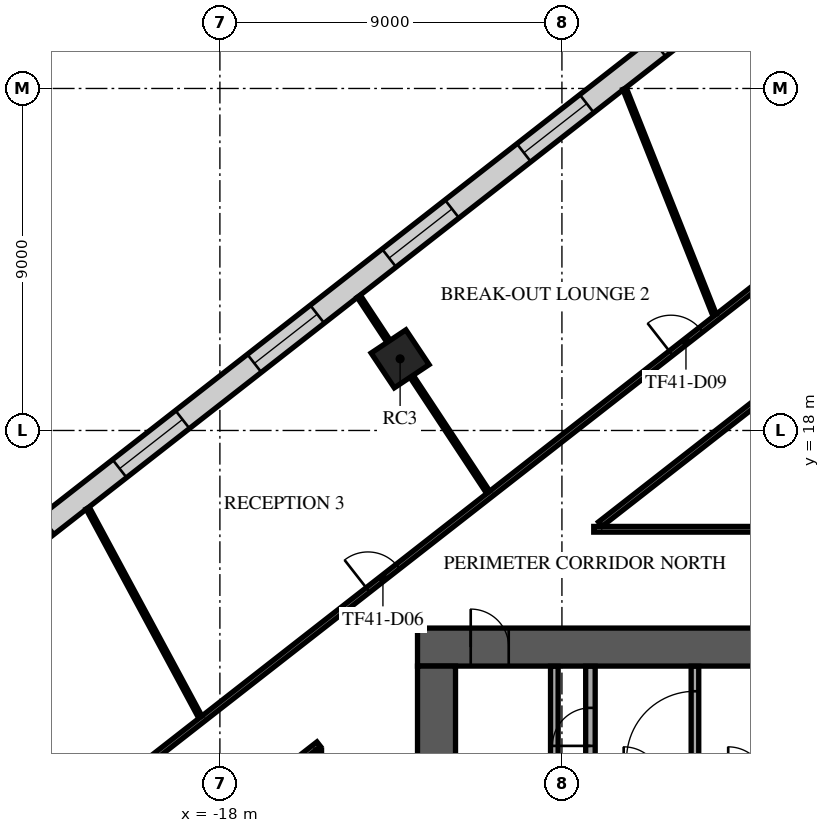
"""IFC4 building model, lengths in metres.
Left out: names, types, materials, properties, quantities, classifications, styles, units other than length and angle.
Written with IfcOpenShell. Run it as: python <this file> out.ifc"""

import sys

from ifc_helpers import new_model, si_unit, direction, frame, frame_2d, origin, origin_2d, place, context, subcontext, project, spatial, rectangle, extrude, element, fill, save


model = new_model("IFC4")
c1 = context("Model", 3, precision=1e-05, world=origin(), true_north=direction((0.0, 1.0)))
c2 = subcontext(c1, "Body", "Model", "MODEL_VIEW")
j1 = project(units=[si_unit("LENGTHUNIT", "METRE"), si_unit("PLANEANGLEUNIT", "RADIAN")], contexts=[c1])
p1 = place(None, origin())
s1 = spatial("IfcSite", under=j1, at=p1, CompositionType="ELEMENT")
p2 = place(p1, origin())
s2 = spatial("IfcBuilding", under=s1, at=p2, CompositionType="ELEMENT")
p3 = place(p2, frame((0.0, 0.0, 175.7)))
s3 = spatial("IfcBuildingStorey", under=s2, at=p3, CompositionType="ELEMENT", Elevation=175.7)
p4 = place(p3, frame((-13.258, 19.885, 0.0), z_axis=(0.0, 0.0, 1.0), x_axis=(0.832028680356, 0.55473261583, 0.0)))
e1 = element("IfcColumn", 1, at=p4, inside=s3, PredefinedType="COLUMN", context=c2, shape_type="SweptSolid", body=[
    extrude(rectangle(XDim=1.1, YDim=1.1, at=origin_2d()), origin(), (0.0, 0.0, 1.0), 4.0),
])
p5 = place(p3, frame((-12.8, 12.3, 0.0), z_axis=(0.0, 0.0, 1.0), x_axis=(1.0, 0.0, 0.0)))
e2 = element("IfcWall", 2, at=p5, inside=s3, PredefinedType="SHEAR", context=c2, shape_type="SweptSolid", body=[
    extrude(rectangle(XDim=25.6, YDim=1.0, at=frame_2d((12.8, 0.0))), origin(), (0.0, 0.0, 1.0), 3.6),
])
p6 = place(p5, frame((11.6, 0.0, 0.0)))
e3 = element("IfcOpeningElement", 3, at=p6, cuts=e2, PredefinedType="OPENING", context=c2, shape_type="SweptSolid", body=[
    extrude(rectangle(XDim=2.4, YDim=2.4, at=frame_2d((1.2, 1.2))), frame((0.0, 0.51, 0.0), z_axis=(0.0, -1.0, 0.0), x_axis=(1.0, 0.0, 0.0)), (0.0, 0.0, 1.0), 1.02),
])
p7 = place(p5, frame((22.425, 0.0, 0.0)))
e4 = element("IfcOpeningElement", 4, at=p7, cuts=e2, PredefinedType="OPENING", context=c2, shape_type="SweptSolid", body=[
    extrude(rectangle(XDim=1.2, YDim=2.1, at=frame_2d((0.6, 1.05))), frame((0.0, 0.51, 0.0), z_axis=(0.0, -1.0, 0.0), x_axis=(1.0, 0.0, 0.0)), (0.0, 0.0, 1.0), 1.02),
])
p8 = place(p5, frame((1.4, 0.0, 0.0)))
e5 = element("IfcOpeningElement", 5, at=p8, cuts=e2, PredefinedType="OPENING", context=c2, shape_type="SweptSolid", body=[
    extrude(rectangle(XDim=1.0, YDim=2.1, at=frame_2d((0.5, 1.05))), frame((0.0, 0.51, 0.0), z_axis=(0.0, -1.0, 0.0), x_axis=(1.0, 0.0, 0.0)), (0.0, 0.0, 1.0), 1.02),
])
p9 = place(p3, frame((-12.3, -11.8, 0.0), z_axis=(0.0, 0.0, 1.0), x_axis=(0.0, 1.0, 0.0)))
e6 = element("IfcWall", 6, at=p9, inside=s3, PredefinedType="SHEAR", context=c2, shape_type="SweptSolid", body=[
    extrude(rectangle(XDim=23.6, YDim=1.0, at=frame_2d((11.8, 0.0))), origin(), (0.0, 0.0, 1.0), 3.6),
])
p10 = place(p9, frame((10.6, 0.0, 0.0)))
e7 = element("IfcOpeningElement", 7, at=p10, cuts=e6, PredefinedType="OPENING", context=c2, shape_type="SweptSolid", body=[
    extrude(rectangle(XDim=2.4, YDim=2.4, at=frame_2d((1.2, 1.2))), frame((0.0, 0.51, 0.0), z_axis=(0.0, -1.0, 0.0), x_axis=(1.0, 0.0, 0.0)), (0.0, 0.0, 1.0), 1.02),
])
p11 = place(p3, frame((-9.2, 4.78, 0.0), z_axis=(0.0, 0.0, 1.0), x_axis=(0.0, 1.0, 0.0)))
e8 = element("IfcWall", 8, at=p11, inside=s3, PredefinedType="PARTITIONING", context=c2, shape_type="SweptSolid", body=[
    extrude(rectangle(XDim=7.015, YDim=0.2, at=frame_2d((3.507, 0.0))), origin(), (0.0, 0.0, 1.0), 3.6),
])
p12 = place(p11, frame((2.92, 0.0, 0.0)))
e9 = element("IfcOpeningElement", 9, at=p12, cuts=e8, PredefinedType="OPENING", context=c2, shape_type="SweptSolid", body=[
    extrude(rectangle(XDim=1.0, YDim=2.1, at=frame_2d((0.5, 1.05))), frame((0.0, 0.11, 0.0), z_axis=(0.0, -1.0, 0.0), x_axis=(1.0, 0.0, 0.0)), (0.0, 0.0, 1.0), 0.22),
])
p13 = place(p3, frame((-8.25, 8.805, 0.0), z_axis=(0.0, 0.0, 1.0), x_axis=(0.0, 1.0, 0.0)))
e10 = element("IfcWall", 10, at=p13, inside=s3, PredefinedType="PARTITIONING", context=c2, shape_type="SweptSolid", body=[
    extrude(rectangle(XDim=2.99, YDim=0.25, at=frame_2d((1.495, 0.0))), origin(), (0.0, 0.0, 1.0), 3.6),
])
p14 = place(p13, frame((0.895, 0.0, 0.0)))
e11 = element("IfcOpeningElement", 11, at=p14, cuts=e10, PredefinedType="OPENING", context=c2, shape_type="SweptSolid", body=[
    extrude(rectangle(XDim=1.0, YDim=2.1, at=frame_2d((0.5, 1.05))), frame((0.0, 0.135, 0.0), z_axis=(0.0, -1.0, 0.0), x_axis=(1.0, 0.0, 0.0)), (0.0, 0.0, 1.0), 0.27),
])
p15 = place(p3, frame((-5.5, 8.805, 0.0), z_axis=(0.0, 0.0, 1.0), x_axis=(0.0, 1.0, 0.0)))
e12 = element("IfcWall", 12, at=p15, inside=s3, PredefinedType="PARTITIONING", context=c2, shape_type="SweptSolid", body=[
    extrude(rectangle(XDim=2.99, YDim=0.2, at=frame_2d((1.495, 0.0))), origin(), (0.0, 0.0, 1.0), 3.6),
])
p16 = place(p15, frame((0.532, 0.0, 0.0)))
e13 = element("IfcOpeningElement", 13, at=p16, cuts=e12, PredefinedType="OPENING", context=c2, shape_type="SweptSolid", body=[
    extrude(rectangle(XDim=1.8, YDim=2.1, at=frame_2d((0.9, 1.05))), frame((0.0, 0.11, 0.0), z_axis=(0.0, -1.0, 0.0), x_axis=(1.0, 0.0, 0.0)), (0.0, 0.0, 1.0), 0.22),
])
p17 = place(p3, frame((3.238, 35.651, 0.0), z_axis=(0.0, 0.0, 1.0), x_axis=(-0.788009530914, -0.615663040298, 0.0)))
e14 = element("IfcWall", 14, at=p17, inside=s3, PredefinedType="STANDARD", context=c2, shape_type="SweptSolid", body=[
    extrude(rectangle(XDim=49.376, YDim=0.6, at=frame_2d((24.688, 0.0))), origin(), (0.0, 0.0, 1.0), 3.6),
])
p18 = place(p17, frame((1.2, 0.0, 0.9)))
e15 = element("IfcOpeningElement", 15, at=p18, cuts=e14, PredefinedType="OPENING", context=c2, shape_type="SweptSolid", body=[
    extrude(rectangle(XDim=2.1, YDim=2.1, at=frame_2d((1.05, 1.05))), frame((0.0, 0.31, 0.0), z_axis=(0.0, -1.0, 0.0), x_axis=(1.0, 0.0, 0.0)), (0.0, 0.0, 1.0), 0.62),
])
p19 = place(p17, frame((5.7, 0.0, 0.9)))
e16 = element("IfcOpeningElement", 16, at=p19, cuts=e14, PredefinedType="OPENING", context=c2, shape_type="SweptSolid", body=[
    extrude(rectangle(XDim=2.1, YDim=2.1, at=frame_2d((1.05, 1.05))), frame((0.0, 0.31, 0.0), z_axis=(0.0, -1.0, 0.0), x_axis=(1.0, 0.0, 0.0)), (0.0, 0.0, 1.0), 0.62),
])
p20 = place(p17, frame((10.2, 0.0, 0.9)))
e17 = element("IfcOpeningElement", 17, at=p20, cuts=e14, PredefinedType="OPENING", context=c2, shape_type="SweptSolid", body=[
    extrude(rectangle(XDim=2.1, YDim=2.1, at=frame_2d((1.05, 1.05))), frame((0.0, 0.31, 0.0), z_axis=(0.0, -1.0, 0.0), x_axis=(1.0, 0.0, 0.0)), (0.0, 0.0, 1.0), 0.62),
])
p21 = place(p17, frame((14.7, 0.0, 0.9)))
e18 = element("IfcOpeningElement", 18, at=p21, cuts=e14, PredefinedType="OPENING", context=c2, shape_type="SweptSolid", body=[
    extrude(rectangle(XDim=2.1, YDim=2.1, at=frame_2d((1.05, 1.05))), frame((0.0, 0.31, 0.0), z_axis=(0.0, -1.0, 0.0), x_axis=(1.0, 0.0, 0.0)), (0.0, 0.0, 1.0), 0.62),
])
p22 = place(p17, frame((19.2, 0.0, 0.9)))
e19 = element("IfcOpeningElement", 19, at=p22, cuts=e14, PredefinedType="OPENING", context=c2, shape_type="SweptSolid", body=[
    extrude(rectangle(XDim=2.1, YDim=2.1, at=frame_2d((1.05, 1.05))), frame((0.0, 0.31, 0.0), z_axis=(0.0, -1.0, 0.0), x_axis=(1.0, 0.0, 0.0)), (0.0, 0.0, 1.0), 0.62),
])
p23 = place(p17, frame((23.7, 0.0, 0.9)))
e20 = element("IfcOpeningElement", 20, at=p23, cuts=e14, PredefinedType="OPENING", context=c2, shape_type="SweptSolid", body=[
    extrude(rectangle(XDim=2.1, YDim=2.1, at=frame_2d((1.05, 1.05))), frame((0.0, 0.31, 0.0), z_axis=(0.0, -1.0, 0.0), x_axis=(1.0, 0.0, 0.0)), (0.0, 0.0, 1.0), 0.62),
])
p24 = place(p17, frame((28.2, 0.0, 0.9)))
e21 = element("IfcOpeningElement", 21, at=p24, cuts=e14, PredefinedType="OPENING", context=c2, shape_type="SweptSolid", body=[
    extrude(rectangle(XDim=2.1, YDim=2.1, at=frame_2d((1.05, 1.05))), frame((0.0, 0.31, 0.0), z_axis=(0.0, -1.0, 0.0), x_axis=(1.0, 0.0, 0.0)), (0.0, 0.0, 1.0), 0.62),
])
p25 = place(p17, frame((32.7, 0.0, 0.9)))
e22 = element("IfcOpeningElement", 22, at=p25, cuts=e14, PredefinedType="OPENING", context=c2, shape_type="SweptSolid", body=[
    extrude(rectangle(XDim=2.1, YDim=2.1, at=frame_2d((1.05, 1.05))), frame((0.0, 0.31, 0.0), z_axis=(0.0, -1.0, 0.0), x_axis=(1.0, 0.0, 0.0)), (0.0, 0.0, 1.0), 0.62),
])
p26 = place(p17, frame((37.2, 0.0, 0.9)))
e23 = element("IfcOpeningElement", 23, at=p26, cuts=e14, PredefinedType="OPENING", context=c2, shape_type="SweptSolid", body=[
    extrude(rectangle(XDim=2.1, YDim=2.1, at=frame_2d((1.05, 1.05))), frame((0.0, 0.31, 0.0), z_axis=(0.0, -1.0, 0.0), x_axis=(1.0, 0.0, 0.0)), (0.0, 0.0, 1.0), 0.62),
])
p27 = place(p17, frame((41.7, 0.0, 0.9)))
e24 = element("IfcOpeningElement", 24, at=p27, cuts=e14, PredefinedType="OPENING", context=c2, shape_type="SweptSolid", body=[
    extrude(rectangle(XDim=2.1, YDim=2.1, at=frame_2d((1.05, 1.05))), frame((0.0, 0.31, 0.0), z_axis=(0.0, -1.0, 0.0), x_axis=(1.0, 0.0, 0.0)), (0.0, 0.0, 1.0), 0.62),
])
p28 = place(p17, frame((46.138, 0.0, 0.9)))
e25 = element("IfcOpeningElement", 25, at=p28, cuts=e14, PredefinedType="OPENING", context=c2, shape_type="SweptSolid", body=[
    extrude(rectangle(XDim=2.1, YDim=2.1, at=frame_2d((1.05, 1.05))), frame((0.0, 0.31, 0.0), z_axis=(0.0, -1.0, 0.0), x_axis=(1.0, 0.0, 0.0)), (0.0, 0.0, 1.0), 0.62),
])
p29 = place(p3, frame((-24.433, 5.734, 0.0), z_axis=(0.0, 0.0, 1.0), x_axis=(0.788010131951, 0.615662271008, 0.0)))
e26 = element("IfcWall", 26, at=p29, inside=s3, PredefinedType="PARTITIONING", context=c2, shape_type="SweptSolid", body=[
    extrude(rectangle(XDim=31.448, YDim=0.15, at=frame_2d((15.724, 0.0))), origin(), (0.0, 0.0, 1.0), 3.15),
])
p30 = place(p29, frame((13.108, 0.0, 0.0)))
e27 = element("IfcOpeningElement", 27, at=p30, cuts=e26, PredefinedType="OPENING", context=c2, shape_type="SweptSolid", body=[
    extrude(rectangle(XDim=1.0, YDim=2.1, at=frame_2d((0.5, 1.05))), frame((0.0, 0.085, 0.0), z_axis=(0.0, -1.0, 0.0), x_axis=(1.0, 0.0, 0.0)), (0.0, 0.0, 1.0), 0.17),
])
p31 = place(p29, frame((23.227, 0.0, 0.0)))
e28 = element("IfcOpeningElement", 28, at=p31, cuts=e26, PredefinedType="OPENING", context=c2, shape_type="SweptSolid", body=[
    extrude(rectangle(XDim=1.0, YDim=2.1, at=frame_2d((0.5, 1.05))), frame((0.0, 0.085, 0.0), z_axis=(0.0, -1.0, 0.0), x_axis=(1.0, 0.0, 0.0)), (0.0, 0.0, 1.0), 0.17),
])
p32 = place(p3, frame((-22.897, 3.888, 0.0), z_axis=(0.0, 0.0, 1.0), x_axis=(0.787982356531, 0.615697820197, 0.0)))
e29 = element("IfcWall", 29, at=p32, inside=s3, PredefinedType="PARTITIONING", context=c2, shape_type="SweptSolid", body=[
    extrude(rectangle(XDim=9.514, YDim=0.15, at=frame_2d((4.757, 0.0))), origin(), (0.0, 0.0, 1.0), 3.15),
])
p33 = place(p3, frame((-15.4, -12.8, 0.0), z_axis=(0.0, 0.0, 1.0), x_axis=(0.0, 1.0, 0.0)))
e30 = element("IfcWall", 30, at=p33, inside=s3, PredefinedType="PARTITIONING", context=c2, shape_type="SweptSolid", body=[
    extrude(rectangle(XDim=22.392, YDim=0.15, at=frame_2d((11.196, 0.0))), origin(), (0.0, 0.0, 1.0), 3.15),
])
p34 = place(p33, frame((9.721, 0.0, 0.0)))
e31 = element("IfcOpeningElement", 31, at=p34, cuts=e30, PredefinedType="OPENING", context=c2, shape_type="SweptSolid", body=[
    extrude(rectangle(XDim=1.8, YDim=2.1, at=frame_2d((0.9, 1.05))), frame((0.0, 0.085, 0.0), z_axis=(0.0, -1.0, 0.0), x_axis=(1.0, 0.0, 0.0)), (0.0, 0.0, 1.0), 0.17),
])
p35 = place(p33, frame((4.3, 0.0, 0.0)))
e32 = element("IfcOpeningElement", 32, at=p35, cuts=e30, PredefinedType="OPENING", context=c2, shape_type="SweptSolid", body=[
    extrude(rectangle(XDim=1.0, YDim=2.1, at=frame_2d((0.5, 1.05))), frame((0.0, 0.085, 0.0), z_axis=(0.0, -1.0, 0.0), x_axis=(1.0, 0.0, 0.0)), (0.0, 0.0, 1.0), 0.17),
])
p36 = place(p33, frame((17.408, 0.0, 0.0)))
e33 = element("IfcOpeningElement", 33, at=p36, cuts=e30, PredefinedType="OPENING", context=c2, shape_type="SweptSolid", body=[
    extrude(rectangle(XDim=1.0, YDim=2.1, at=frame_2d((0.5, 1.05))), frame((0.0, 0.085, 0.0), z_axis=(0.0, -1.0, 0.0), x_axis=(1.0, 0.0, 0.0)), (0.0, 0.0, 1.0), 0.17),
])
p37 = place(p3, frame((-8.163, 15.4, 0.0), z_axis=(0.0, 0.0, 1.0), x_axis=(1.0, 0.0, 0.0)))
e34 = element("IfcWall", 34, at=p37, inside=s3, PredefinedType="PARTITIONING", context=c2, shape_type="SweptSolid", body=[
    extrude(rectangle(XDim=7.211, YDim=0.15, at=frame_2d((3.605, 0.0))), origin(), (0.0, 0.0, 1.0), 3.15),
])
p38 = place(p3, frame((-7.991, 15.534, 0.0), z_axis=(0.0, 0.0, 1.0), x_axis=(0.788030651404, 0.615636006459, 0.0)))
e35 = element("IfcWall", 35, at=p38, inside=s3, PredefinedType="PARTITIONING", context=c2, shape_type="SweptSolid", body=[
    extrude(rectangle(XDim=12.382, YDim=0.15, at=frame_2d((6.191, 0.0))), origin(), (0.0, 0.0, 1.0), 3.15),
])
p39 = place(p3, frame((-21.478, 15.958, 0.0), z_axis=(0.0, 0.0, 1.0), x_axis=(0.474316685511, -0.880354293365, 0.0)))
e36 = element("IfcWall", 36, at=p39, inside=s3, PredefinedType="PARTITIONING", context=c2, shape_type="SweptSolid", body=[
    extrude(rectangle(XDim=6.243, YDim=0.1, at=frame_2d((3.122, 0.0))), origin(), (0.0, 0.0, 1.0), 2.9),
])
p40 = place(p3, frame((-14.344, 21.531, 0.0), z_axis=(0.0, 0.0, 1.0), x_axis=(0.550851774101, -0.834603093075, 0.0)))
e37 = element("IfcWall", 37, at=p40, inside=s3, PredefinedType="PARTITIONING", context=c2, shape_type="SweptSolid", body=[
    extrude(rectangle(XDim=1.422, YDim=0.1, at=frame_2d((0.711, 0.0))), origin(), (0.0, 0.0, 1.0), 3.6),
])
p41 = place(p3, frame((-12.955, 19.426, 0.0), z_axis=(0.0, 0.0, 1.0), x_axis=(0.55082545929, -0.834620460687, 0.0)))
e38 = element("IfcWall", 38, at=p41, inside=s3, PredefinedType="PARTITIONING", context=c2, shape_type="SweptSolid", body=[
    extrude(rectangle(XDim=3.655, YDim=0.1, at=frame_2d((1.828, 0.0))), origin(), (0.0, 0.0, 1.0), 3.15),
])
p42 = place(p3, frame((-7.351, 26.995, 0.0), z_axis=(0.0, 0.0, 1.0), x_axis=(0.369457986925, -0.929247435239, 0.0)))
e39 = element("IfcWall", 39, at=p42, inside=s3, PredefinedType="PARTITIONING", context=c2, shape_type="SweptSolid", body=[
    extrude(rectangle(XDim=6.406, YDim=0.1, at=frame_2d((3.203, 0.0))), origin(), (0.0, 0.0, 1.0), 2.9),
])
p43 = place(p8, origin())
e40 = element("IfcDoor", 40, at=p43, inside=s3, OperationType="SINGLE_SWING_LEFT", PredefinedType="DOOR", context=c2, shape_type="SweptSolid", body=[
    extrude(rectangle(XDim=1.0, YDim=2.1, at=frame_2d((0.5, 1.05))), frame((0.0, 0.025, 0.0), z_axis=(0.0, -1.0, 0.0), x_axis=(1.0, 0.0, 0.0)), (0.0, 0.0, 1.0), 0.05),
])
fill(e5, e40)
p44 = place(p14, origin())
e41 = element("IfcDoor", 41, at=p44, inside=s3, OperationType="SINGLE_SWING_RIGHT", PredefinedType="DOOR", context=c2, shape_type="SweptSolid", body=[
    extrude(rectangle(XDim=1.0, YDim=2.1, at=frame_2d((0.5, 1.05))), frame((0.0, 0.025, 0.0), z_axis=(0.0, -1.0, 0.0), x_axis=(1.0, 0.0, 0.0)), (0.0, 0.0, 1.0), 0.05),
])
fill(e11, e41)
p45 = place(p16, origin())
e42 = element("IfcDoor", 42, at=p45, inside=s3, OperationType="SINGLE_SWING_LEFT", PredefinedType="DOOR", context=c2, shape_type="SweptSolid", body=[
    extrude(rectangle(XDim=1.8, YDim=2.1, at=frame_2d((0.9, 1.05))), frame((0.0, 0.025, 0.0), z_axis=(0.0, -1.0, 0.0), x_axis=(1.0, 0.0, 0.0)), (0.0, 0.0, 1.0), 0.05),
])
fill(e13, e42)
p46 = place(p21, origin())
e43 = element("IfcWindow", 43, at=p46, inside=s3, PartitioningType="SINGLE_PANEL", PredefinedType="WINDOW", context=c2, shape_type="SweptSolid", body=[
    extrude(rectangle(XDim=2.1, YDim=2.1, at=frame_2d((1.05, 1.05))), frame((0.0, 0.03, 0.0), z_axis=(0.0, -1.0, 0.0), x_axis=(1.0, 0.0, 0.0)), (0.0, 0.0, 1.0), 0.06),
])
fill(e18, e43)
p47 = place(p22, origin())
e44 = element("IfcWindow", 44, at=p47, inside=s3, PartitioningType="SINGLE_PANEL", PredefinedType="WINDOW", context=c2, shape_type="SweptSolid", body=[
    extrude(rectangle(XDim=2.1, YDim=2.1, at=frame_2d((1.05, 1.05))), frame((0.0, 0.03, 0.0), z_axis=(0.0, -1.0, 0.0), x_axis=(1.0, 0.0, 0.0)), (0.0, 0.0, 1.0), 0.06),
])
fill(e19, e44)
p48 = place(p23, origin())
e45 = element("IfcWindow", 45, at=p48, inside=s3, PartitioningType="SINGLE_PANEL", PredefinedType="WINDOW", context=c2, shape_type="SweptSolid", body=[
    extrude(rectangle(XDim=2.1, YDim=2.1, at=frame_2d((1.05, 1.05))), frame((0.0, 0.03, 0.0), z_axis=(0.0, -1.0, 0.0), x_axis=(1.0, 0.0, 0.0)), (0.0, 0.0, 1.0), 0.06),
])
fill(e20, e45)
p49 = place(p24, origin())
e46 = element("IfcWindow", 46, at=p49, inside=s3, PartitioningType="SINGLE_PANEL", PredefinedType="WINDOW", context=c2, shape_type="SweptSolid", body=[
    extrude(rectangle(XDim=2.1, YDim=2.1, at=frame_2d((1.05, 1.05))), frame((0.0, 0.03, 0.0), z_axis=(0.0, -1.0, 0.0), x_axis=(1.0, 0.0, 0.0)), (0.0, 0.0, 1.0), 0.06),
])
fill(e21, e46)
p50 = place(p30, origin())
e47 = element("IfcDoor", 47, at=p50, inside=s3, OperationType="SINGLE_SWING_LEFT", PredefinedType="DOOR", context=c2, shape_type="SweptSolid", body=[
    extrude(rectangle(XDim=1.0, YDim=2.1, at=frame_2d((0.5, 1.05))), frame((0.0, 0.025, 0.0), z_axis=(0.0, -1.0, 0.0), x_axis=(1.0, 0.0, 0.0)), (0.0, 0.0, 1.0), 0.05),
])
fill(e27, e47)
p51 = place(p31, origin())
e48 = element("IfcDoor", 48, at=p51, inside=s3, OperationType="SINGLE_SWING_RIGHT", PredefinedType="DOOR", context=c2, shape_type="SweptSolid", body=[
    extrude(rectangle(XDim=1.0, YDim=2.1, at=frame_2d((0.5, 1.05))), frame((0.0, 0.025, 0.0), z_axis=(0.0, -1.0, 0.0), x_axis=(1.0, 0.0, 0.0)), (0.0, 0.0, 1.0), 0.05),
])
fill(e28, e48)
save(model, sys.argv[1])
